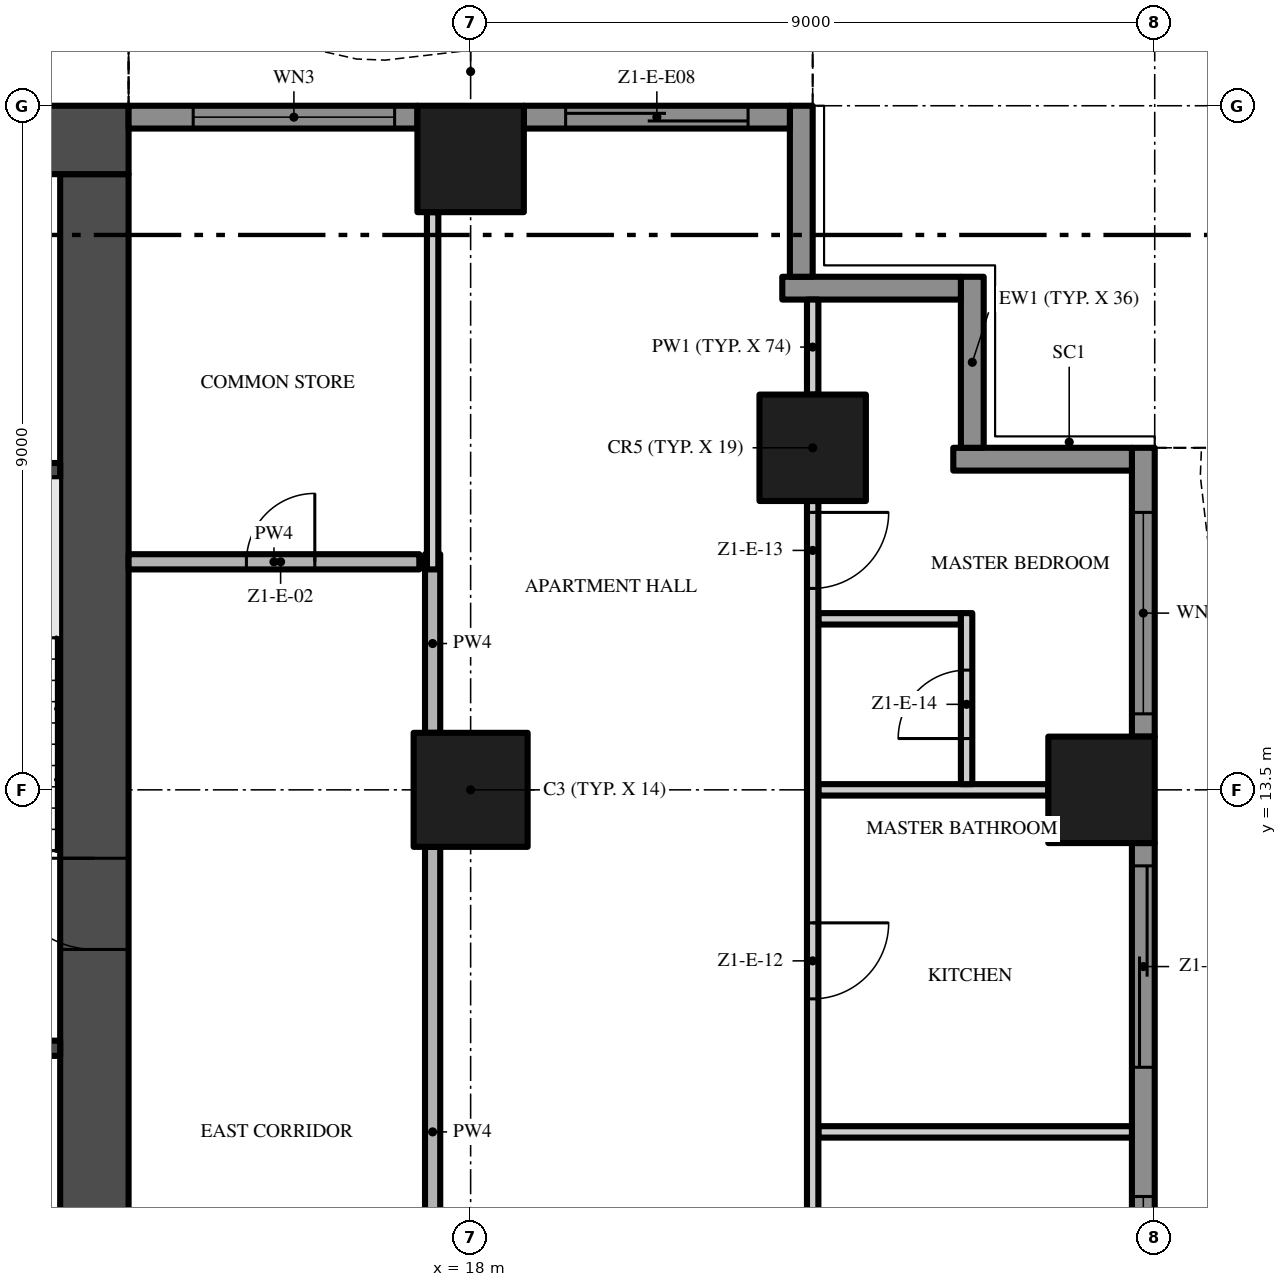
"""IFC4 building model, lengths in metres.
Left out: names, types, materials, properties, quantities, classifications, styles, units other than length and angle.
Written with IfcOpenShell. Run it as: python <this file> out.ifc"""

import sys

from ifc_helpers import new_model, si_unit, direction, frame, frame_2d, origin, origin_2d, place, context, subcontext, project, spatial, polyline, rectangle, outline, extrude, element, fill, save


model = new_model("IFC4")
c1 = context("Model", 3, precision=1e-05, world=origin(), true_north=direction((0.0, 1.0)))
c2 = subcontext(c1, "Body", "Model", "MODEL_VIEW")
j1 = project(units=[si_unit("LENGTHUNIT", "METRE"), si_unit("PLANEANGLEUNIT", "RADIAN")], contexts=[c1])
p1 = place(None, origin())
s1 = spatial("IfcSite", under=j1, at=p1, CompositionType="ELEMENT")
p2 = place(p1, origin())
s2 = spatial("IfcBuilding", under=s1, at=p2, CompositionType="ELEMENT")
p3 = place(p2, frame((0.0, 0.0, 56.8)))
s3 = spatial("IfcBuildingStorey", under=s2, at=p3, CompositionType="ELEMENT", Elevation=56.8)
p4 = place(p3, frame((13.05, 5.4, -0.3), z_axis=(0.0, 0.0, 1.0), x_axis=(0.0, 1.0, 0.0)))
e1 = element("IfcWall", 1, at=p4, inside=s3, PredefinedType="SHEAR", context=c2, shape_type="SweptSolid", body=[
    extrude(rectangle(XDim=16.2, YDim=0.9, at=frame_2d((8.1, 0.0))), origin(), (0.0, 0.0, 1.0), 3.8),
])
p5 = place(p4, frame((6.0, 0.0, 0.3)))
e2 = element("IfcOpeningElement", 2, at=p5, cuts=e1, PredefinedType="OPENING", context=c2, shape_type="SweptSolid", body=[
    extrude(rectangle(XDim=1.2, YDim=2.2, at=frame_2d((0.6, 1.1))), frame((0.0, 0.46, 0.0), z_axis=(0.0, -1.0, 0.0), x_axis=(1.0, 0.0, 0.0)), (0.0, 0.0, 1.0), 0.92),
])
p6 = place(p3, frame((13.5, 22.05, -0.3), z_axis=(0.0, 0.0, 1.0), x_axis=(-1.0, 0.0, 0.0)))
e3 = element("IfcWall", 3, at=p6, inside=s3, PredefinedType="SHEAR", context=c2, shape_type="SweptSolid", body=[
    extrude(rectangle(XDim=27.0, YDim=0.9, at=frame_2d((13.5, 0.0))), origin(), (0.0, 0.0, 1.0), 3.8),
])
p7 = place(p3, frame((18.0, 13.5, 0.0), z_axis=(0.0, 0.0, 1.0), x_axis=(1.0, 0.0, 0.0)))
e4 = element("IfcColumn", 4, at=p7, inside=s3, PredefinedType="COLUMN", context=c2, shape_type="SweptSolid", body=[
    extrude(rectangle(XDim=1.5, YDim=1.5, at=origin_2d()), origin(), (0.0, 0.0, 1.0), 3.5),
])
for number, where, z_axis, x_axis in (
    (5, (18.0, 21.8, 0.0), (0.0, 0.0, 1.0), (1.0, 0.0, 0.0)),
    (6, (26.3, 13.5, 0.0), (0.0, 0.0, 1.0), (1.0, 0.0, 0.0)),
    (7, (22.5, 18.0, 0.0), (0.0, 0.0, 1.0), (1.0, 0.0, 0.0)),
):
    element("IfcColumn", number, at=place(p3, frame(where, z_axis=z_axis, x_axis=x_axis)), inside=s3, PredefinedType="COLUMN", context=c2, shape_type="SweptSolid", body=[
        extrude(rectangle(XDim=1.4, YDim=1.4, at=origin_2d()), origin(), (0.0, 0.0, 1.0), 3.5),
    ])
p8 = place(p3, frame((26.85, 12.8, 0.0), z_axis=(0.0, 0.0, 1.0), x_axis=(0.0, -1.0, 0.0)))
e8 = element("IfcWall", 8, at=p8, inside=s3, PredefinedType="SOLIDWALL", context=c2, shape_type="SweptSolid", body=[
    extrude(rectangle(XDim=7.6, YDim=0.3, at=frame_2d((3.8, 0.0))), origin(), (0.0, 0.0, 1.0), 3.5),
])
p9 = place(p8, frame((4.65, 0.0, 0.45)))
e9 = element("IfcOpeningElement", 9, at=p9, cuts=e8, PredefinedType="OPENING", context=c2, shape_type="SweptSolid", body=[
    extrude(rectangle(XDim=2.65, YDim=2.65, at=frame_2d((1.325, 1.325))), frame((0.0, 0.16, 0.0), z_axis=(0.0, -1.0, 0.0), x_axis=(1.0, 0.0, 0.0)), (0.0, 0.0, 1.0), 0.32),
])
p10 = place(p8, frame((0.3, 0.0, 0.0)))
e10 = element("IfcOpeningElement", 10, at=p10, cuts=e8, PredefinedType="OPENING", context=c2, shape_type="SweptSolid", body=[
    extrude(rectangle(XDim=2.65, YDim=2.4, at=frame_2d((1.325, 1.2))), frame((0.0, 0.16, 0.0), z_axis=(0.0, -1.0, 0.0), x_axis=(1.0, 0.0, 0.0)), (0.0, 0.0, 1.0), 0.32),
])
p11 = place(p3, frame((26.85, 18.0, 0.0), z_axis=(0.0, 0.0, 1.0), x_axis=(0.0, -1.0, 0.0)))
e11 = element("IfcWall", 11, at=p11, inside=s3, PredefinedType="SOLIDWALL", context=c2, shape_type="SweptSolid", body=[
    extrude(rectangle(XDim=3.8, YDim=0.3, at=frame_2d((1.9, 0.0))), origin(), (0.0, 0.0, 1.0), 3.5),
])
p12 = place(p11, frame((0.85, 0.0, 0.45)))
e12 = element("IfcOpeningElement", 12, at=p12, cuts=e11, PredefinedType="OPENING", context=c2, shape_type="SweptSolid", body=[
    extrude(rectangle(XDim=2.65, YDim=2.65, at=frame_2d((1.325, 1.325))), frame((0.0, 0.16, 0.0), z_axis=(0.0, -1.0, 0.0), x_axis=(1.0, 0.0, 0.0)), (0.0, 0.0, 1.0), 0.32),
])
p13 = place(p3, frame((24.35, 17.85, 0.0), z_axis=(0.0, 0.0, 1.0), x_axis=(1.0, 0.0, 0.0)))
e13 = element("IfcWall", 13, at=p13, inside=s3, PredefinedType="SOLIDWALL", context=c2, shape_type="SweptSolid", body=[
    extrude(rectangle(XDim=2.35, YDim=0.3, at=frame_2d((1.175, 0.0))), origin(), (0.0, 0.0, 1.0), 3.5),
])
p14 = place(p3, frame((24.6, 20.25, 0.0), z_axis=(0.0, 0.0, 1.0), x_axis=(0.0, -1.0, 0.0)))
e14 = element("IfcWall", 14, at=p14, inside=s3, PredefinedType="SOLIDWALL", context=c2, shape_type="SweptSolid", body=[
    extrude(rectangle(XDim=2.25, YDim=0.3, at=frame_2d((1.125, 0.0))), origin(), (0.0, 0.0, 1.0), 3.5),
])
p15 = place(p3, frame((22.1, 20.1, 0.0), z_axis=(0.0, 0.0, 1.0), x_axis=(1.0, 0.0, 0.0)))
e15 = element("IfcWall", 15, at=p15, inside=s3, PredefinedType="SOLIDWALL", context=c2, shape_type="SweptSolid", body=[
    extrude(rectangle(XDim=2.35, YDim=0.3, at=frame_2d((1.175, 0.0))), origin(), (0.0, 0.0, 1.0), 3.5),
])
p16 = place(p3, frame((22.35, 22.5, 0.0), z_axis=(0.0, 0.0, 1.0), x_axis=(0.0, -1.0, 0.0)))
e16 = element("IfcWall", 16, at=p16, inside=s3, PredefinedType="SOLIDWALL", context=c2, shape_type="SweptSolid", body=[
    extrude(rectangle(XDim=2.25, YDim=0.3, at=frame_2d((1.125, 0.0))), origin(), (0.0, 0.0, 1.0), 3.5),
])
p17 = place(p3, frame((18.7, 22.35, 0.0), z_axis=(0.0, 0.0, 1.0), x_axis=(1.0, 0.0, 0.0)))
e17 = element("IfcWall", 17, at=p17, inside=s3, PredefinedType="SOLIDWALL", context=c2, shape_type="SweptSolid", body=[
    extrude(rectangle(XDim=3.5, YDim=0.3, at=frame_2d((1.75, 0.0))), origin(), (0.0, 0.0, 1.0), 3.5),
])
p18 = place(p17, frame((0.55, 0.0, 0.0)))
e18 = element("IfcOpeningElement", 18, at=p18, cuts=e17, PredefinedType="OPENING", context=c2, shape_type="SweptSolid", body=[
    extrude(rectangle(XDim=2.4, YDim=2.4, at=frame_2d((1.2, 1.2))), frame((0.0, 0.16, 0.0), z_axis=(0.0, -1.0, 0.0), x_axis=(1.0, 0.0, 0.0)), (0.0, 0.0, 1.0), 0.32),
])
p19 = place(p3, frame((13.5, 22.35, 0.0), z_axis=(0.0, 0.0, 1.0), x_axis=(1.0, 0.0, 0.0)))
e19 = element("IfcWall", 19, at=p19, inside=s3, PredefinedType="SOLIDWALL", context=c2, shape_type="SweptSolid", body=[
    extrude(rectangle(XDim=3.8, YDim=0.3, at=frame_2d((1.9, 0.0))), origin(), (0.0, 0.0, 1.0), 3.5),
])
p20 = place(p19, frame((0.85, 0.0, 0.45)))
e20 = element("IfcOpeningElement", 20, at=p20, cuts=e19, PredefinedType="OPENING", context=c2, shape_type="SweptSolid", body=[
    extrude(rectangle(XDim=2.65, YDim=2.65, at=frame_2d((1.325, 1.325))), frame((0.0, 0.16, 0.0), z_axis=(0.0, -1.0, 0.0), x_axis=(1.0, 0.0, 0.0)), (0.0, 0.0, 1.0), 0.32),
])
p21 = place(p3, origin())
e21 = element("IfcWall", 21, at=p21, inside=s3, PredefinedType="USERDEFINED", context=c2, shape_type="SweptSolid", body=[
    extrude(outline(polyline([(29.649, -18.0), (28.988, -16.5), (28.255, -15.0), (27.731, -13.5), (27.6, -12.375), (27.615, -12.0), (27.951, -10.5), (28.612, -9.0), (29.345, -7.5), (29.869, -6.0), (30.0, -4.875), (29.985, -4.5), (29.649, -3.0), (28.988, -1.5), (28.255, 0.0), (27.731, 1.5), (27.6, 2.625), (27.615, 3.0), (27.951, 4.5), (28.612, 6.0), (29.345, 7.5), (29.869, 9.0), (30.0, 10.125), (29.985, 10.5), (29.649, 12.0), (28.988, 13.5), (28.255, 15.0), (27.731, 16.5), (27.6, 17.625), (27.615, 18.0), (27.365, 18.01), (27.349, 17.615), (27.486, 16.444), (28.024, 14.904), (28.761, 13.395), (29.41, 11.921), (29.736, 10.467), (29.749, 10.135), (29.624, 9.056), (29.114, 7.596), (28.385, 6.105), (27.713, 4.579), (27.366, 3.033), (27.349, 2.615), (27.486, 1.444), (28.024, -0.096), (28.761, -1.605), (29.41, -3.079), (29.736, -4.533), (29.749, -4.865), (29.624, -5.944), (29.114, -7.404), (28.385, -8.895), (27.713, -10.421), (27.366, -11.967), (27.349, -12.385), (27.486, -13.556), (28.024, -15.096), (28.761, -16.605), (29.42, -18.101), (29.649, -18.0)])), origin(), (0.0, 0.0, 1.0), 0.9),
])
p22 = place(p3, origin())
e22 = element("IfcWall", 22, at=p22, inside=s3, PredefinedType="USERDEFINED", context=c2, shape_type="SweptSolid", body=[
    extrude(outline(polyline([(22.5, 25.149), (21.0, 24.488), (19.5, 23.755), (18.0, 23.231), (16.875, 23.1), (16.5, 23.115), (15.0, 23.451), (13.5, 24.112), (13.399, 23.883), (14.921, 23.213), (16.467, 22.866), (16.885, 22.849), (18.056, 22.986), (19.596, 23.524), (21.105, 24.261), (22.601, 24.92), (22.5, 25.149)])), origin(), (0.0, 0.0, 1.0), 0.9),
])
for number, where, z_axis, x_axis in (
    (23, (9.65, 10.1, 0.0), (0.0, 0.0, 1.0), (1.0, 0.0, 0.0)),
    (24, (9.65, 17.7, 0.0), (0.0, 0.0, 1.0), (1.0, 0.0, 0.0)),
):
    element("IfcWall", number, at=place(p3, frame(where, z_axis=z_axis, x_axis=x_axis)), inside=s3, PredefinedType="SHEAR", context=c2, shape_type="SweptSolid", body=[
        extrude(rectangle(XDim=2.95, YDim=0.2, at=frame_2d((1.475, 0.0))), origin(), (0.0, 0.0, 1.0), 3.5),
    ])
p23 = place(p3, frame((22.575, 9.0, 0.0), z_axis=(0.0, 0.0, 1.0), x_axis=(1.0, 0.0, 0.0)))
e25 = element("IfcWall", 25, at=p23, inside=s3, PredefinedType="PARTITIONING", context=c2, shape_type="SweptSolid", body=[
    extrude(rectangle(XDim=4.125, YDim=0.15, at=frame_2d((2.062, 0.0))), origin(), (0.0, 0.0, 1.0), 3.5),
])
p24 = place(p3, frame((22.575, 13.5, 0.0), z_axis=(0.0, 0.0, 1.0), x_axis=(1.0, 0.0, 0.0)))
e26 = element("IfcWall", 26, at=p24, inside=s3, PredefinedType="PARTITIONING", context=c2, shape_type="SweptSolid", body=[
    extrude(rectangle(XDim=3.025, YDim=0.15, at=frame_2d((1.512, 0.0))), origin(), (0.0, 0.0, 1.0), 3.5),
])
p25 = place(p3, frame((22.575, 15.75, 0.0), z_axis=(0.0, 0.0, 1.0), x_axis=(1.0, 0.0, 0.0)))
e27 = element("IfcWall", 27, at=p25, inside=s3, PredefinedType="PARTITIONING", context=c2, shape_type="SweptSolid", body=[
    extrude(rectangle(XDim=1.875, YDim=0.15, at=frame_2d((0.938, 0.0))), origin(), (0.0, 0.0, 1.0), 3.5),
])
p26 = place(p3, frame((13.5, 16.5, 0.0), z_axis=(0.0, 0.0, 1.0), x_axis=(1.0, 0.0, 0.0)))
e28 = element("IfcWall", 28, at=p26, inside=s3, PredefinedType="PARTITIONING", context=c2, shape_type="SweptSolid", body=[
    extrude(rectangle(XDim=3.825, YDim=0.2, at=frame_2d((1.913, 0.0))), origin(), (0.0, 0.0, 1.0), 3.5),
])
p27 = place(p26, frame((1.55, 0.0, 0.0)))
e29 = element("IfcOpeningElement", 29, at=p27, cuts=e28, PredefinedType="OPENING", context=c2, shape_type="SweptSolid", body=[
    extrude(rectangle(XDim=0.9, YDim=2.1, at=frame_2d((0.45, 1.05))), frame((0.0, 0.11, 0.0), z_axis=(0.0, -1.0, 0.0), x_axis=(1.0, 0.0, 0.0)), (0.0, 0.0, 1.0), 0.22),
])
p28 = place(p3, frame((17.5, 12.75, 0.0), z_axis=(0.0, 0.0, 1.0), x_axis=(0.0, -1.0, 0.0)))
e30 = element("IfcWall", 30, at=p28, inside=s3, PredefinedType="PARTITIONING", context=c2, shape_type="SweptSolid", body=[
    extrude(rectangle(XDim=7.5, YDim=0.2, at=frame_2d((3.75, 0.0))), origin(), (0.0, 0.0, 1.0), 3.5),
])
p29 = place(p28, frame((5.4, 0.0, 0.0)))
e31 = element("IfcOpeningElement", 31, at=p29, cuts=e30, PredefinedType="OPENING", context=c2, shape_type="SweptSolid", body=[
    extrude(rectangle(XDim=1.2, YDim=2.4, at=frame_2d((0.6, 1.2))), frame((0.0, 0.11, 0.0), z_axis=(0.0, -1.0, 0.0), x_axis=(1.0, 0.0, 0.0)), (0.0, 0.0, 1.0), 0.22),
])
p30 = place(p3, frame((17.5, 14.25, 0.0), z_axis=(0.0, 0.0, 1.0), x_axis=(0.0, 1.0, 0.0)))
e32 = element("IfcWall", 32, at=p30, inside=s3, PredefinedType="PARTITIONING", context=c2, shape_type="SweptSolid", body=[
    extrude(rectangle(XDim=2.35, YDim=0.2, at=frame_2d((1.175, 0.0))), origin(), (0.0, 0.0, 1.0), 3.5),
])
p31 = place(p3, frame((17.5, 16.4, 0.0), z_axis=(0.0, 0.0, 1.0), x_axis=(0.0, 1.0, 0.0)))
e33 = element("IfcWall", 33, at=p31, inside=s3, PredefinedType="PARTITIONING", context=c2, shape_type="SweptSolid", body=[
    extrude(rectangle(XDim=4.7, YDim=0.15, at=frame_2d((2.35, 0.0))), origin(), (0.0, 0.0, 1.0), 3.5),
])
p32 = place(p3, frame((22.5, 17.3, 0.0), z_axis=(0.0, 0.0, 1.0), x_axis=(0.0, -1.0, 0.0)))
e34 = element("IfcWall", 34, at=p32, inside=s3, PredefinedType="PARTITIONING", context=c2, shape_type="SweptSolid", body=[
    extrude(rectangle(XDim=17.2, YDim=0.15, at=frame_2d((8.6, 0.0))), origin(), (0.0, 0.0, 1.0), 3.5),
])
p33 = place(p32, frame((13.0, 0.0, 0.0)))
e35 = element("IfcOpeningElement", 35, at=p33, cuts=e34, PredefinedType="OPENING", context=c2, shape_type="SweptSolid", body=[
    extrude(rectangle(XDim=1.8, YDim=2.4, at=frame_2d((0.9, 1.2))), frame((0.0, 0.085, 0.0), z_axis=(0.0, -1.0, 0.0), x_axis=(1.0, 0.0, 0.0)), (0.0, 0.0, 1.0), 0.17),
])
p34 = place(p32, frame((5.55, 0.0, 0.0)))
e36 = element("IfcOpeningElement", 36, at=p34, cuts=e34, PredefinedType="OPENING", context=c2, shape_type="SweptSolid", body=[
    extrude(rectangle(XDim=1.0, YDim=2.4, at=frame_2d((0.5, 1.2))), frame((0.0, 0.085, 0.0), z_axis=(0.0, -1.0, 0.0), x_axis=(1.0, 0.0, 0.0)), (0.0, 0.0, 1.0), 0.17),
])
p35 = place(p32, frame((0.15, 0.0, 0.0)))
e37 = element("IfcOpeningElement", 37, at=p35, cuts=e34, PredefinedType="OPENING", context=c2, shape_type="SweptSolid", body=[
    extrude(rectangle(XDim=1.0, YDim=2.4, at=frame_2d((0.5, 1.2))), frame((0.0, 0.085, 0.0), z_axis=(0.0, -1.0, 0.0), x_axis=(1.0, 0.0, 0.0)), (0.0, 0.0, 1.0), 0.17),
])
p36 = place(p3, frame((22.5, 18.7, 0.0), z_axis=(0.0, 0.0, 1.0), x_axis=(0.0, 1.0, 0.0)))
e38 = element("IfcWall", 38, at=p36, inside=s3, PredefinedType="PARTITIONING", context=c2, shape_type="SweptSolid", body=[
    extrude(rectangle(XDim=1.25, YDim=0.15, at=frame_2d((0.625, 0.0))), origin(), (0.0, 0.0, 1.0), 3.5),
])
p37 = place(p3, frame((24.525, 13.575, 0.0), z_axis=(0.0, 0.0, 1.0), x_axis=(0.0, 1.0, 0.0)))
e39 = element("IfcWall", 39, at=p37, inside=s3, PredefinedType="PARTITIONING", context=c2, shape_type="SweptSolid", body=[
    extrude(rectangle(XDim=2.25, YDim=0.15, at=frame_2d((1.125, 0.0))), origin(), (0.0, 0.0, 1.0), 3.5),
])
p38 = place(p37, frame((0.6, 0.0, 0.0)))
e40 = element("IfcOpeningElement", 40, at=p38, cuts=e39, PredefinedType="OPENING", context=c2, shape_type="SweptSolid", body=[
    extrude(rectangle(XDim=0.9, YDim=2.1, at=frame_2d((0.45, 1.05))), frame((0.0, 0.085, 0.0), z_axis=(0.0, -1.0, 0.0), x_axis=(1.0, 0.0, 0.0)), (0.0, 0.0, 1.0), 0.17),
])
p39 = place(p9, origin())
e41 = element("IfcWindow", 41, at=p39, inside=s3, PartitioningType="SINGLE_PANEL", PredefinedType="WINDOW", context=c2, shape_type="SweptSolid", body=[
    extrude(rectangle(XDim=2.65, YDim=2.65, at=frame_2d((1.325, 1.325))), frame((0.0, 0.03, 0.0), z_axis=(0.0, -1.0, 0.0), x_axis=(1.0, 0.0, 0.0)), (0.0, 0.0, 1.0), 0.06),
])
fill(e9, e41)
p40 = place(p10, origin())
e42 = element("IfcDoor", 42, at=p40, inside=s3, OperationType="SINGLE_SWING_LEFT", PredefinedType="DOOR", context=c2, shape_type="SweptSolid", body=[
    extrude(rectangle(XDim=2.65, YDim=2.4, at=frame_2d((1.325, 1.2))), frame((0.0, 0.025, 0.0), z_axis=(0.0, -1.0, 0.0), x_axis=(1.0, 0.0, 0.0)), (0.0, 0.0, 1.0), 0.05),
])
fill(e10, e42)
p41 = place(p12, origin())
e43 = element("IfcWindow", 43, at=p41, inside=s3, PartitioningType="SINGLE_PANEL", PredefinedType="WINDOW", context=c2, shape_type="SweptSolid", body=[
    extrude(rectangle(XDim=2.65, YDim=2.65, at=frame_2d((1.325, 1.325))), frame((0.0, 0.03, 0.0), z_axis=(0.0, -1.0, 0.0), x_axis=(1.0, 0.0, 0.0)), (0.0, 0.0, 1.0), 0.06),
])
fill(e12, e43)
p42 = place(p18, origin())
e44 = element("IfcDoor", 44, at=p42, inside=s3, OperationType="SINGLE_SWING_LEFT", PredefinedType="DOOR", context=c2, shape_type="SweptSolid", body=[
    extrude(rectangle(XDim=2.4, YDim=2.4, at=frame_2d((1.2, 1.2))), frame((0.0, 0.025, 0.0), z_axis=(0.0, -1.0, 0.0), x_axis=(1.0, 0.0, 0.0)), (0.0, 0.0, 1.0), 0.05),
])
fill(e18, e44)
p43 = place(p20, origin())
e45 = element("IfcWindow", 45, at=p43, inside=s3, PartitioningType="SINGLE_PANEL", PredefinedType="WINDOW", context=c2, shape_type="SweptSolid", body=[
    extrude(rectangle(XDim=2.65, YDim=2.65, at=frame_2d((1.325, 1.325))), frame((0.0, 0.03, 0.0), z_axis=(0.0, -1.0, 0.0), x_axis=(1.0, 0.0, 0.0)), (0.0, 0.0, 1.0), 0.06),
])
fill(e20, e45)
p44 = place(p5, frame((1.2, 0.0, 0.0), z_axis=(0.0, 0.0, 1.0), x_axis=(-1.0, 0.0, 0.0)))
e46 = element("IfcDoor", 46, at=p44, inside=s3, OperationType="SINGLE_SWING_LEFT", PredefinedType="DOOR", context=c2, shape_type="SweptSolid", body=[
    extrude(rectangle(XDim=1.2, YDim=2.2, at=frame_2d((0.6, 1.1))), frame((0.0, 0.025, 0.0), z_axis=(0.0, -1.0, 0.0), x_axis=(1.0, 0.0, 0.0)), (0.0, 0.0, 1.0), 0.05),
])
fill(e2, e46)
p45 = place(p27, origin())
e47 = element("IfcDoor", 47, at=p45, inside=s3, OperationType="SINGLE_SWING_RIGHT", PredefinedType="DOOR", context=c2, shape_type="SweptSolid", body=[
    extrude(rectangle(XDim=0.9, YDim=2.1, at=frame_2d((0.45, 1.05))), frame((0.0, 0.025, 0.0), z_axis=(0.0, -1.0, 0.0), x_axis=(1.0, 0.0, 0.0)), (0.0, 0.0, 1.0), 0.05),
])
fill(e29, e47)
p46 = place(p34, origin())
e48 = element("IfcDoor", 48, at=p46, inside=s3, OperationType="SINGLE_SWING_LEFT", PredefinedType="DOOR", context=c2, shape_type="SweptSolid", body=[
    extrude(rectangle(XDim=1.0, YDim=2.4, at=frame_2d((0.5, 1.2))), frame((0.0, 0.025, 0.0), z_axis=(0.0, -1.0, 0.0), x_axis=(1.0, 0.0, 0.0)), (0.0, 0.0, 1.0), 0.05),
])
fill(e36, e48)
p47 = place(p35, origin())
e49 = element("IfcDoor", 49, at=p47, inside=s3, OperationType="SINGLE_SWING_LEFT", PredefinedType="DOOR", context=c2, shape_type="SweptSolid", body=[
    extrude(rectangle(XDim=1.0, YDim=2.4, at=frame_2d((0.5, 1.2))), frame((0.0, 0.025, 0.0), z_axis=(0.0, -1.0, 0.0), x_axis=(1.0, 0.0, 0.0)), (0.0, 0.0, 1.0), 0.05),
])
fill(e37, e49)
p48 = place(p38, origin())
e50 = element("IfcDoor", 50, at=p48, inside=s3, OperationType="SINGLE_SWING_LEFT", PredefinedType="DOOR", context=c2, shape_type="SweptSolid", body=[
    extrude(rectangle(XDim=0.9, YDim=2.1, at=frame_2d((0.45, 1.05))), frame((0.0, 0.025, 0.0), z_axis=(0.0, -1.0, 0.0), x_axis=(1.0, 0.0, 0.0)), (0.0, 0.0, 1.0), 0.05),
])
fill(e40, e50)
save(model, sys.argv[1])
